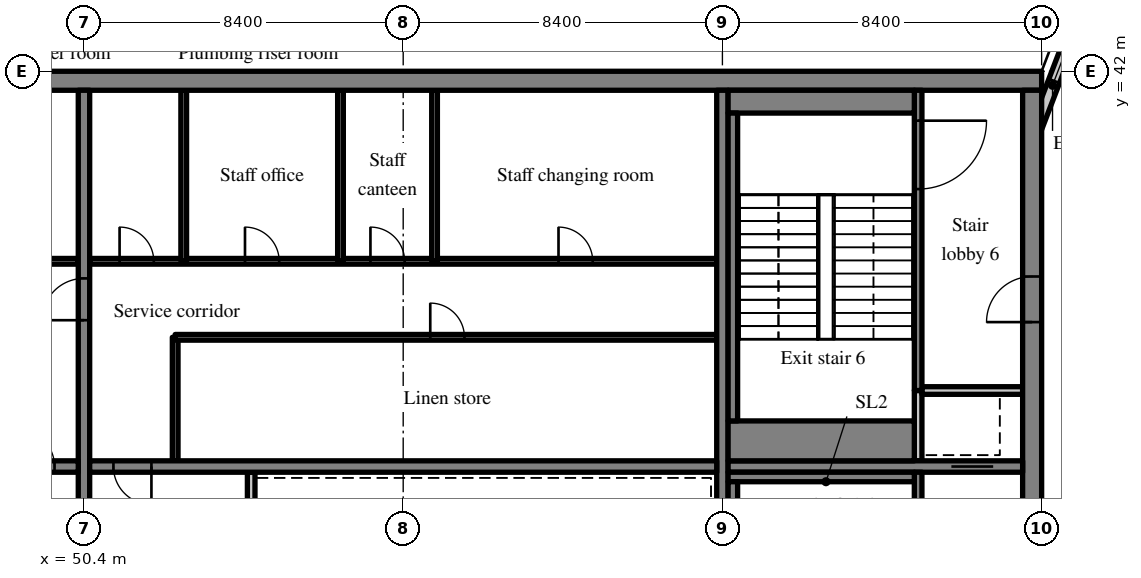
"""IFC4 building model, lengths in metres.
Left out: names, types, materials, properties, quantities, classifications, styles, units other than length and angle.
Written with IfcOpenShell. Run it as: python <this file> out.ifc"""

import sys

from ifc_helpers import new_model, si_unit, direction, frame, frame_2d, origin, place, context, subcontext, project, spatial, rectangle, extrude, source, transform, mapped, element, fill, save


model = new_model("IFC4")
c1 = context("Model", 3, precision=1e-05, world=origin(), true_north=direction((0.0, 1.0)))
c2 = subcontext(c1, "Body", "Model", "MODEL_VIEW")
j1 = project(units=[si_unit("LENGTHUNIT", "METRE"), si_unit("PLANEANGLEUNIT", "RADIAN")], contexts=[c1])
p1 = place(None, origin())
s1 = spatial("IfcSite", under=j1, at=p1, CompositionType="ELEMENT")
p2 = place(p1, origin())
s2 = spatial("IfcBuilding", under=s1, at=p2, CompositionType="ELEMENT")
p3 = place(p2, frame((0.0, 0.0, 309.7)))
s3 = spatial("IfcBuildingStorey", under=s2, at=p3, CompositionType="ELEMENT", Elevation=309.7)
m1 = source(origin(), c2, "Body", "SweptSolid", [
    extrude(rectangle(XDim=50.4, YDim=0.5, at=frame_2d((25.2, 0.0))), origin(), (0.0, 0.0, 1.0), 3.72),
])
p4 = place(p3, frame((25.2, 41.75, 0.0), z_axis=(0.0, 0.0, 1.0), x_axis=(1.0, 0.0, 0.0)))
e1 = element("IfcWall", 1, at=p4, inside=s3, PredefinedType="SHEAR", context=c2, shape_type="MappedRepresentation", body=[
    mapped(m1, transform((0.0, 0.0, 0.0), scale=1.0)),
])
m2 = source(origin(), c2, "Body", "SweptSolid", [
    extrude(rectangle(XDim=19.0, YDim=0.5, at=frame_2d((9.5, 0.0))), origin(), (0.0, 0.0, 1.0), 3.72),
])
p5 = place(p3, frame((75.35, 22.5, 0.0), z_axis=(0.0, 0.0, 1.0), x_axis=(0.0, 1.0, 0.0)))
e2 = element("IfcWall", 2, at=p5, inside=s3, PredefinedType="SHEAR", context=c2, shape_type="MappedRepresentation", body=[
    mapped(m2, transform((0.0, 0.0, 0.0), scale=1.0)),
])
m3 = source(origin(), c2, "Body", "SweptSolid", [
    extrude(rectangle(XDim=1.2, YDim=2.1, at=frame_2d((0.6, 1.05))), frame((0.0, 0.26, 0.0), z_axis=(0.0, -1.0, 0.0), x_axis=(1.0, 0.0, 0.0)), (0.0, 0.0, 1.0), 0.52),
])
p6 = place(p5, frame((12.9, 0.0, 0.0)))
e3 = element("IfcOpeningElement", 3, at=p6, cuts=e2, PredefinedType="OPENING", context=c2, shape_type="MappedRepresentation", body=[
    mapped(m3, transform((0.0, 0.0, 0.0), scale=1.0)),
])
m4 = source(origin(), c2, "Body", "SweptSolid", [
    extrude(rectangle(XDim=19.0, YDim=0.3, at=frame_2d((9.5, 0.0))), origin(), (0.0, 0.0, 1.0), 3.72),
])
p7 = place(p3, frame((50.4, 22.5, 0.0), z_axis=(0.0, 0.0, 1.0), x_axis=(0.0, 1.0, 0.0)))
e4 = element("IfcWall", 4, at=p7, inside=s3, PredefinedType="SHEAR", context=c2, shape_type="MappedRepresentation", body=[
    mapped(m4, transform((0.0, 0.0, 0.0), scale=1.0)),
])
m5 = source(origin(), c2, "Body", "SweptSolid", [
    extrude(rectangle(XDim=1.1, YDim=2.1, at=frame_2d((0.55, 1.05))), frame((0.0, 0.16, 0.0), z_axis=(0.0, -1.0, 0.0), x_axis=(1.0, 0.0, 0.0)), (0.0, 0.0, 1.0), 0.32),
])
p8 = place(p7, frame((12.95, 0.0, 0.0)))
e5 = element("IfcOpeningElement", 5, at=p8, cuts=e4, PredefinedType="OPENING", context=c2, shape_type="MappedRepresentation", body=[
    mapped(m5, transform((0.0, 0.0, 0.0), scale=1.0)),
])
p9 = place(p3, frame((67.2, 22.5, 0.0), z_axis=(0.0, 0.0, 1.0), x_axis=(0.0, 1.0, 0.0)))
e6 = element("IfcWall", 6, at=p9, inside=s3, PredefinedType="SHEAR", context=c2, shape_type="MappedRepresentation", body=[
    mapped(m4, transform((0.0, 0.0, 0.0), scale=1.0)),
])
m6 = source(origin(), c2, "Body", "SweptSolid", [
    extrude(rectangle(XDim=16.5, YDim=0.3, at=frame_2d((8.25, 0.0))), origin(), (0.0, 0.0, 1.0), 3.72),
])
p10 = place(p3, frame((33.75, 31.6, 0.0), z_axis=(0.0, 0.0, 1.0), x_axis=(1.0, 0.0, 0.0)))
e7 = element("IfcWall", 7, at=p10, inside=s3, PredefinedType="SHEAR", context=c2, shape_type="MappedRepresentation", body=[
    mapped(m6, transform((0.0, 0.0, 0.0), scale=1.0)),
])
m7 = source(origin(), c2, "Body", "SweptSolid", [
    extrude(rectangle(XDim=1.0, YDim=2.1, at=frame_2d((0.5, 1.05))), frame((0.0, 0.16, 0.0), z_axis=(0.0, -1.0, 0.0), x_axis=(1.0, 0.0, 0.0)), (0.0, 0.0, 1.0), 0.32),
])
p11 = place(p10, frame((14.875, 0.0, 0.0)))
e8 = element("IfcOpeningElement", 8, at=p11, cuts=e7, PredefinedType="OPENING", context=c2, shape_type="MappedRepresentation", body=[
    mapped(m7, transform((0.0, 0.0, 0.0), scale=1.0)),
])
p12 = place(p3, frame((50.55, 31.6, 0.0), z_axis=(0.0, 0.0, 1.0), x_axis=(1.0, 0.0, 0.0)))
e9 = element("IfcWall", 9, at=p12, inside=s3, PredefinedType="SHEAR", context=c2, shape_type="MappedRepresentation", body=[
    mapped(m6, transform((0.0, 0.0, 0.0), scale=1.0)),
])
p13 = place(p12, frame((0.625, 0.0, 0.0)))
e10 = element("IfcOpeningElement", 10, at=p13, cuts=e9, PredefinedType="OPENING", context=c2, shape_type="MappedRepresentation", body=[
    mapped(m7, transform((0.0, 0.0, 0.0), scale=1.0)),
])
m8 = source(origin(), c2, "Body", "SweptSolid", [
    extrude(rectangle(XDim=7.75, YDim=0.3, at=frame_2d((3.875, 0.0))), origin(), (0.0, 0.0, 1.0), 3.72),
])
p14 = place(p3, frame((67.35, 31.6, 0.0), z_axis=(0.0, 0.0, 1.0), x_axis=(1.0, 0.0, 0.0)))
e11 = element("IfcWall", 11, at=p14, inside=s3, PredefinedType="SHEAR", context=c2, shape_type="MappedRepresentation", body=[
    mapped(m8, transform((0.0, 0.0, 0.0), scale=1.0)),
])
p15 = place(p14, frame((5.875, 0.0, 0.0)))
e12 = element("IfcOpeningElement", 12, at=p15, cuts=e11, PredefinedType="OPENING", context=c2, shape_type="MappedRepresentation", body=[
    mapped(m5, transform((0.0, 0.0, 0.0), scale=1.0)),
])
m9 = source(origin(), c2, "Body", "SweptSolid", [
    extrude(rectangle(XDim=3.559, YDim=0.3, at=frame_2d((1.78, 0.0))), origin(), (0.0, 0.0, 1.0), 3.72),
])
p16 = place(p3, frame((76.523, 43.292, 0.0), z_axis=(0.0, 0.0, 1.0), x_axis=(-0.35779745313, -0.933799219604, 0.0)))
e13 = element("IfcWall", 13, at=p16, inside=s3, PredefinedType="SOLIDWALL", context=c2, shape_type="MappedRepresentation", body=[
    mapped(m9, transform((0.0, 0.0, 0.0), scale=1.0)),
])
m10 = source(origin(), c2, "Body", "SweptSolid", [
    extrude(rectangle(XDim=1.5, YDim=2.0, at=frame_2d((0.75, 1.0))), frame((0.0, 0.16, 0.0), z_axis=(0.0, -1.0, 0.0), x_axis=(1.0, 0.0, 0.0)), (0.0, 0.0, 1.0), 0.32),
])
p17 = place(p16, frame((0.156, 0.0, 0.9)))
e14 = element("IfcOpeningElement", 14, at=p17, cuts=e13, PredefinedType="OPENING", context=c2, shape_type="MappedRepresentation", body=[
    mapped(m10, transform((0.0, 0.0, 0.0), scale=1.0)),
])
m11 = source(origin(), c2, "Body", "SweptSolid", [
    extrude(rectangle(XDim=16.5, YDim=0.15, at=frame_2d((8.25, 0.0))), origin(), (0.0, 0.0, 1.0), 3.72),
])
p18 = place(p3, frame((33.75, 37.0, 0.0), z_axis=(0.0, 0.0, 1.0), x_axis=(1.0, 0.0, 0.0)))
e15 = element("IfcWall", 15, at=p18, inside=s3, PredefinedType="PARTITIONING", context=c2, shape_type="MappedRepresentation", body=[
    mapped(m11, transform((0.0, 0.0, 0.0), scale=1.0)),
])
m12 = source(origin(), c2, "Body", "SweptSolid", [
    extrude(rectangle(XDim=0.9, YDim=2.1, at=frame_2d((0.45, 1.05))), frame((0.0, 0.085, 0.0), z_axis=(0.0, -1.0, 0.0), x_axis=(1.0, 0.0, 0.0)), (0.0, 0.0, 1.0), 0.17),
])
p19 = place(p18, frame((1.612, 0.0, 0.0)))
e16 = element("IfcOpeningElement", 16, at=p19, cuts=e15, PredefinedType="OPENING", context=c2, shape_type="MappedRepresentation", body=[
    mapped(m12, transform((0.0, 0.0, 0.0), scale=1.0)),
])
p20 = place(p18, frame((7.387, 0.0, 0.0)))
e17 = element("IfcOpeningElement", 17, at=p20, cuts=e15, PredefinedType="OPENING", context=c2, shape_type="MappedRepresentation", body=[
    mapped(m12, transform((0.0, 0.0, 0.0), scale=1.0)),
])
p21 = place(p18, frame((12.337, 0.0, 0.0)))
e18 = element("IfcOpeningElement", 18, at=p21, cuts=e15, PredefinedType="OPENING", context=c2, shape_type="MappedRepresentation", body=[
    mapped(m12, transform((0.0, 0.0, 0.0), scale=1.0)),
])
p22 = place(p18, frame((14.813, 0.0, 0.0)))
e19 = element("IfcOpeningElement", 19, at=p22, cuts=e15, PredefinedType="OPENING", context=c2, shape_type="MappedRepresentation", body=[
    mapped(m12, transform((0.0, 0.0, 0.0), scale=1.0)),
])
m13 = source(origin(), c2, "Body", "SweptSolid", [
    extrude(rectangle(XDim=2.65, YDim=0.2, at=frame_2d((1.325, 0.0))), origin(), (0.0, 0.0, 1.0), 3.72),
])
p23 = place(p3, frame((54.8, 28.8, 0.0), z_axis=(0.0, 0.0, 1.0), x_axis=(0.0, 1.0, 0.0)))
e20 = element("IfcWall", 20, at=p23, inside=s3, PredefinedType="SOLIDWALL", context=c2, shape_type="MappedRepresentation", body=[
    mapped(m13, transform((0.0, 0.0, 0.0), scale=1.0)),
])
m14 = source(origin(), c2, "Body", "SweptSolid", [
    extrude(rectangle(XDim=3.25, YDim=0.15, at=frame_2d((1.625, 0.0))), origin(), (0.0, 0.0, 1.0), 3.72),
])
p24 = place(p3, frame((52.8, 31.75, 0.0), z_axis=(0.0, 0.0, 1.0), x_axis=(0.0, 1.0, 0.0)))
e21 = element("IfcWall", 21, at=p24, inside=s3, PredefinedType="PARTITIONING", context=c2, shape_type="MappedRepresentation", body=[
    mapped(m14, transform((0.0, 0.0, 0.0), scale=1.0)),
])
m15 = source(origin(), c2, "Body", "SweptSolid", [
    extrude(rectangle(XDim=14.25, YDim=0.15, at=frame_2d((7.125, 0.0))), origin(), (0.0, 0.0, 1.0), 3.72),
])
p25 = place(p3, frame((67.05, 35.0, 0.0), z_axis=(0.0, 0.0, 1.0), x_axis=(-1.0, 0.0, 0.0)))
e22 = element("IfcWall", 22, at=p25, inside=s3, PredefinedType="PARTITIONING", context=c2, shape_type="MappedRepresentation", body=[
    mapped(m15, transform((0.0, 0.0, 0.0), scale=1.0)),
])
p26 = place(p25, frame((6.638, 0.0, 0.0)))
e23 = element("IfcOpeningElement", 23, at=p26, cuts=e22, PredefinedType="OPENING", context=c2, shape_type="MappedRepresentation", body=[
    mapped(m12, transform((0.0, 0.0, 0.0), scale=1.0)),
])
p27 = place(p3, frame((67.05, 37.0, 0.0), z_axis=(0.0, 0.0, 1.0), x_axis=(-1.0, 0.0, 0.0)))
e24 = element("IfcWall", 24, at=p27, inside=s3, PredefinedType="PARTITIONING", context=c2, shape_type="MappedRepresentation", body=[
    mapped(m11, transform((0.0, 0.0, 0.0), scale=1.0)),
])
p28 = place(p27, frame((3.263, 0.0, 0.0)))
e25 = element("IfcOpeningElement", 25, at=p28, cuts=e24, PredefinedType="OPENING", context=c2, shape_type="MappedRepresentation", body=[
    mapped(m12, transform((0.0, 0.0, 0.0), scale=1.0)),
])
p29 = place(p27, frame((8.212, 0.0, 0.0)))
e26 = element("IfcOpeningElement", 26, at=p29, cuts=e24, PredefinedType="OPENING", context=c2, shape_type="MappedRepresentation", body=[
    mapped(m12, transform((0.0, 0.0, 0.0), scale=1.0)),
])
p30 = place(p27, frame((11.513, 0.0, 0.0)))
e27 = element("IfcOpeningElement", 27, at=p30, cuts=e24, PredefinedType="OPENING", context=c2, shape_type="MappedRepresentation", body=[
    mapped(m12, transform((0.0, 0.0, 0.0), scale=1.0)),
])
p31 = place(p27, frame((14.813, 0.0, 0.0)))
e28 = element("IfcOpeningElement", 28, at=p31, cuts=e24, PredefinedType="OPENING", context=c2, shape_type="MappedRepresentation", body=[
    mapped(m12, transform((0.0, 0.0, 0.0), scale=1.0)),
])
m16 = source(origin(), c2, "Body", "SweptSolid", [
    extrude(rectangle(XDim=4.5, YDim=0.15, at=frame_2d((2.25, 0.0))), origin(), (0.0, 0.0, 1.0), 3.72),
])
for number, where, z_axis, x_axis in (
    (29, (59.625, 37.0, 0.0), (0.0, 0.0, 1.0), (0.0, 1.0, 0.0)),
    (30, (57.15, 37.0, 0.0), (0.0, 0.0, 1.0), (0.0, 1.0, 0.0)),
    (31, (53.025, 37.0, 0.0), (0.0, 0.0, 1.0), (0.0, 1.0, 0.0)),
):
    element("IfcWall", number, at=place(p3, frame(where, z_axis=z_axis, x_axis=x_axis)), inside=s3, PredefinedType="PARTITIONING", context=c2, shape_type="MappedRepresentation", body=[
        mapped(m16, transform((0.0, 0.0, 0.0), scale=1.0)),
    ])
m17 = source(origin(), c2, "Body", "SweptSolid", [
    extrude(rectangle(XDim=8.95, YDim=0.2, at=frame_2d((4.475, 0.0))), origin(), (0.0, 0.0, 1.0), 3.72),
])
p32 = place(p3, frame((72.35, 22.5, 0.0), z_axis=(0.0, 0.0, 1.0), x_axis=(0.0, 1.0, 0.0)))
e32 = element("IfcWall", 32, at=p32, inside=s3, PredefinedType="SOLIDWALL", context=c2, shape_type="MappedRepresentation", body=[
    mapped(m17, transform((0.0, 0.0, 0.0), scale=1.0)),
])
m18 = source(origin(), c2, "Body", "SweptSolid", [
    extrude(rectangle(XDim=1.2, YDim=2.1, at=frame_2d((0.6, 1.05))), frame((0.0, 0.11, 0.0), z_axis=(0.0, -1.0, 0.0), x_axis=(1.0, 0.0, 0.0)), (0.0, 0.0, 1.0), 0.22),
])
p33 = place(p32, frame((7.0, 0.0, 0.0)))
e33 = element("IfcOpeningElement", 33, at=p33, cuts=e32, PredefinedType="OPENING", context=c2, shape_type="MappedRepresentation", body=[
    mapped(m18, transform((0.0, 0.0, 0.0), scale=1.0)),
])
m19 = source(origin(), c2, "Body", "SweptSolid", [
    extrude(rectangle(XDim=1.85, YDim=0.2, at=frame_2d((0.925, 0.0))), origin(), (0.0, 0.0, 1.0), 3.72),
])
p34 = place(p3, frame((72.35, 31.75, 0.0), z_axis=(0.0, 0.0, 1.0), x_axis=(0.0, 1.0, 0.0)))
e34 = element("IfcWall", 34, at=p34, inside=s3, PredefinedType="SOLIDWALL", context=c2, shape_type="MappedRepresentation", body=[
    mapped(m19, transform((0.0, 0.0, 0.0), scale=1.0)),
])
m20 = source(origin(), c2, "Body", "SweptSolid", [
    extrude(rectangle(XDim=2.65, YDim=0.2, at=frame_2d((1.325, 0.0))), origin(), (0.0, 0.0, 1.0), 3.72),
])
p35 = place(p3, frame((72.45, 33.6, 0.0), z_axis=(0.0, 0.0, 1.0), x_axis=(1.0, 0.0, 0.0)))
e35 = element("IfcWall", 35, at=p35, inside=s3, PredefinedType="SOLIDWALL", context=c2, shape_type="MappedRepresentation", body=[
    mapped(m20, transform((0.0, 0.0, 0.0), scale=1.0)),
])
m21 = source(origin(), c2, "Body", "SweptSolid", [
    extrude(rectangle(XDim=7.9, YDim=0.2, at=frame_2d((3.95, 0.0))), origin(), (0.0, 0.0, 1.0), 3.72),
])
p36 = place(p3, frame((72.35, 33.6, 0.0), z_axis=(0.0, 0.0, 1.0), x_axis=(0.0, 1.0, 0.0)))
e36 = element("IfcWall", 36, at=p36, inside=s3, PredefinedType="SOLIDWALL", context=c2, shape_type="MappedRepresentation", body=[
    mapped(m21, transform((0.0, 0.0, 0.0), scale=1.0)),
])
m22 = source(origin(), c2, "Body", "SweptSolid", [
    extrude(rectangle(XDim=1.8, YDim=2.1, at=frame_2d((0.9, 1.05))), frame((0.0, 0.11, 0.0), z_axis=(0.0, -1.0, 0.0), x_axis=(1.0, 0.0, 0.0)), (0.0, 0.0, 1.0), 0.22),
])
p37 = place(p36, frame((5.3, 0.0, 0.0)))
e37 = element("IfcOpeningElement", 37, at=p37, cuts=e36, PredefinedType="OPENING", context=c2, shape_type="MappedRepresentation", body=[
    mapped(m22, transform((0.0, 0.0, 0.0), scale=1.0)),
])
m23 = source(origin(), c2, "Body", "SweptSolid", [
    extrude(rectangle(XDim=4.9, YDim=0.25, at=frame_2d((2.45, 0.0))), origin(), (0.0, 0.0, 1.0), 3.72),
])
p38 = place(p3, frame((67.35, 31.325, 0.0), z_axis=(0.0, 0.0, 1.0), x_axis=(1.0, 0.0, 0.0)))
e38 = element("IfcWall", 38, at=p38, inside=s3, PredefinedType="SOLIDWALL", context=c2, shape_type="MappedRepresentation", body=[
    mapped(m23, transform((0.0, 0.0, 0.0), scale=1.0)),
])
m24 = source(origin(), c2, "Body", "SweptSolid", [
    extrude(rectangle(XDim=8.1, YDim=0.25, at=frame_2d((4.05, 0.0))), origin(), (0.0, 0.0, 1.0), 3.72),
])
p39 = place(p3, frame((67.475, 23.1, 0.0), z_axis=(0.0, 0.0, 1.0), x_axis=(0.0, 1.0, 0.0)))
e39 = element("IfcWall", 39, at=p39, inside=s3, PredefinedType="SOLIDWALL", context=c2, shape_type="MappedRepresentation", body=[
    mapped(m24, transform((0.0, 0.0, 0.0), scale=1.0)),
])
m25 = source(origin(), c2, "Body", "SweptSolid", [
    extrude(rectangle(XDim=4.9, YDim=0.6, at=frame_2d((2.45, 0.0))), origin(), (0.0, 0.0, 1.0), 3.72),
])
p40 = place(p3, frame((67.35, 41.2, 0.0), z_axis=(0.0, 0.0, 1.0), x_axis=(1.0, 0.0, 0.0)))
e40 = element("IfcWall", 40, at=p40, inside=s3, PredefinedType="SOLIDWALL", context=c2, shape_type="MappedRepresentation", body=[
    mapped(m25, transform((0.0, 0.0, 0.0), scale=1.0)),
])
m26 = source(origin(), c2, "Body", "SweptSolid", [
    extrude(rectangle(XDim=4.9, YDim=1.05, at=frame_2d((2.45, 0.0))), origin(), (0.0, 0.0, 1.0), 3.72),
])
p41 = place(p3, frame((67.35, 32.275, 0.0), z_axis=(0.0, 0.0, 1.0), x_axis=(1.0, 0.0, 0.0)))
e41 = element("IfcWall", 41, at=p41, inside=s3, PredefinedType="SOLIDWALL", context=c2, shape_type="MappedRepresentation", body=[
    mapped(m26, transform((0.0, 0.0, 0.0), scale=1.0)),
])
p42 = place(p3, frame((67.475, 32.8, 0.0), z_axis=(0.0, 0.0, 1.0), x_axis=(0.0, 1.0, 0.0)))
e42 = element("IfcWall", 42, at=p42, inside=s3, PredefinedType="SOLIDWALL", context=c2, shape_type="MappedRepresentation", body=[
    mapped(m24, transform((0.0, 0.0, 0.0), scale=1.0)),
])
m27 = source(origin(), c2, "Body", "SweptSolid", [
    extrude(rectangle(XDim=1.5, YDim=2.0, at=frame_2d((0.75, 1.0))), frame((0.0, 0.03, 0.0), z_axis=(0.0, -1.0, 0.0), x_axis=(1.0, 0.0, 0.0)), (0.0, 0.0, 1.0), 0.06),
])
p43 = place(p17, origin())
e43 = element("IfcWindow", 43, at=p43, inside=s3, PartitioningType="SINGLE_PANEL", PredefinedType="WINDOW", context=c2, shape_type="MappedRepresentation", body=[
    mapped(m27, transform((0.0, 0.0, 0.0), scale=1.0)),
])
fill(e14, e43)
m28 = source(origin(), c2, "Body", "SweptSolid", [
    extrude(rectangle(XDim=1.0, YDim=2.1, at=frame_2d((0.5, 1.05))), frame((0.0, 0.025, 0.0), z_axis=(0.0, -1.0, 0.0), x_axis=(1.0, 0.0, 0.0)), (0.0, 0.0, 1.0), 0.05),
])
p44 = place(p11, origin())
e44 = element("IfcDoor", 44, at=p44, inside=s3, OperationType="SINGLE_SWING_LEFT", PredefinedType="DOOR", context=c2, shape_type="MappedRepresentation", body=[
    mapped(m28, transform((0.0, 0.0, 0.0), scale=1.0)),
])
fill(e8, e44)
p45 = place(p13, origin())
e45 = element("IfcDoor", 45, at=p45, inside=s3, OperationType="SINGLE_SWING_RIGHT", PredefinedType="DOOR", context=c2, shape_type="MappedRepresentation", body=[
    mapped(m28, transform((0.0, 0.0, 0.0), scale=1.0)),
])
fill(e10, e45)
m29 = source(origin(), c2, "Body", "SweptSolid", [
    extrude(rectangle(XDim=0.9, YDim=2.1, at=frame_2d((0.45, 1.05))), frame((0.0, 0.025, 0.0), z_axis=(0.0, -1.0, 0.0), x_axis=(1.0, 0.0, 0.0)), (0.0, 0.0, 1.0), 0.05),
])
p46 = place(p26, origin())
e46 = element("IfcDoor", 46, at=p46, inside=s3, OperationType="SINGLE_SWING_RIGHT", PredefinedType="DOOR", context=c2, shape_type="MappedRepresentation", body=[
    mapped(m29, transform((0.0, 0.0, 0.0), scale=1.0)),
])
fill(e23, e46)
p47 = place(p28, origin())
e47 = element("IfcDoor", 47, at=p47, inside=s3, OperationType="SINGLE_SWING_RIGHT", PredefinedType="DOOR", context=c2, shape_type="MappedRepresentation", body=[
    mapped(m29, transform((0.0, 0.0, 0.0), scale=1.0)),
])
fill(e25, e47)
p48 = place(p29, origin())
e48 = element("IfcDoor", 48, at=p48, inside=s3, OperationType="SINGLE_SWING_RIGHT", PredefinedType="DOOR", context=c2, shape_type="MappedRepresentation", body=[
    mapped(m29, transform((0.0, 0.0, 0.0), scale=1.0)),
])
fill(e26, e48)
p49 = place(p30, origin())
e49 = element("IfcDoor", 49, at=p49, inside=s3, OperationType="SINGLE_SWING_RIGHT", PredefinedType="DOOR", context=c2, shape_type="MappedRepresentation", body=[
    mapped(m29, transform((0.0, 0.0, 0.0), scale=1.0)),
])
fill(e27, e49)
p50 = place(p31, origin())
e50 = element("IfcDoor", 50, at=p50, inside=s3, OperationType="SINGLE_SWING_RIGHT", PredefinedType="DOOR", context=c2, shape_type="MappedRepresentation", body=[
    mapped(m29, transform((0.0, 0.0, 0.0), scale=1.0)),
])
fill(e28, e50)
m30 = source(origin(), c2, "Body", "SweptSolid", [
    extrude(rectangle(XDim=1.1, YDim=2.1, at=frame_2d((0.55, 1.05))), frame((0.0, 0.025, 0.0), z_axis=(0.0, -1.0, 0.0), x_axis=(1.0, 0.0, 0.0)), (0.0, 0.0, 1.0), 0.05),
])
p51 = place(p15, origin())
e51 = element("IfcDoor", 51, at=p51, inside=s3, OperationType="SLIDING_TO_LEFT", PredefinedType="DOOR", context=c2, shape_type="MappedRepresentation", body=[
    mapped(m30, transform((0.0, 0.0, 0.0), scale=1.0)),
])
fill(e12, e51)
m31 = source(origin(), c2, "Body", "SweptSolid", [
    extrude(rectangle(XDim=1.8, YDim=2.1, at=frame_2d((0.9, 1.05))), frame((0.0, 0.025, 0.0), z_axis=(0.0, -1.0, 0.0), x_axis=(1.0, 0.0, 0.0)), (0.0, 0.0, 1.0), 0.05),
])
p52 = place(p37, origin())
e52 = element("IfcDoor", 52, at=p52, inside=s3, OperationType="SINGLE_SWING_RIGHT", PredefinedType="DOOR", context=c2, shape_type="MappedRepresentation", body=[
    mapped(m31, transform((0.0, 0.0, 0.0), scale=1.0)),
])
fill(e37, e52)
m32 = source(origin(), c2, "Body", "SweptSolid", [
    extrude(rectangle(XDim=1.2, YDim=2.1, at=frame_2d((0.6, 1.05))), frame((0.0, 0.025, 0.0), z_axis=(0.0, -1.0, 0.0), x_axis=(1.0, 0.0, 0.0)), (0.0, 0.0, 1.0), 0.05),
])
p53 = place(p6, origin())
e53 = element("IfcDoor", 53, at=p53, inside=s3, OperationType="SINGLE_SWING_LEFT", PredefinedType="DOOR", context=c2, shape_type="MappedRepresentation", body=[
    mapped(m32, transform((0.0, 0.0, 0.0), scale=1.0)),
])
fill(e3, e53)
p54 = place(p8, origin())
e54 = element("IfcDoor", 54, at=p54, inside=s3, OperationType="SINGLE_SWING_LEFT", PredefinedType="DOOR", context=c2, shape_type="MappedRepresentation", body=[
    mapped(m30, transform((0.0, 0.0, 0.0), scale=1.0)),
])
fill(e5, e54)
save(model, sys.argv[1])
